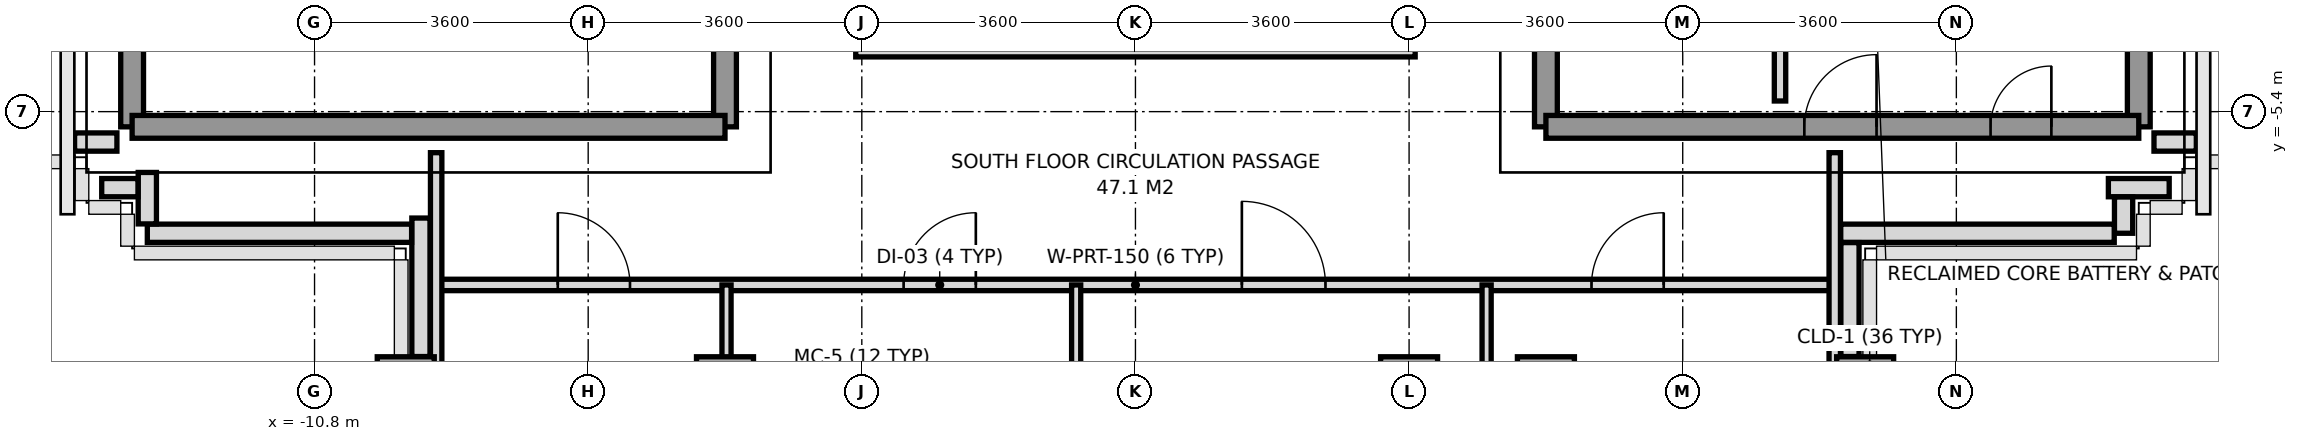
"""IFC4 building model, lengths in metres.
Left out: names, types, materials, properties, quantities, classifications, styles, units other than length and angle.
Written with IfcOpenShell. Run it as: python <this file> out.ifc"""

import sys

from ifc_helpers import new_model, si_unit, direction, frame, frame_2d, origin, origin_2d, place, context, subcontext, project, spatial, rectangle, extrude, source, transform, mapped, element, fill, save


model = new_model("IFC4")
c1 = context("Model", 3, precision=1e-05, world=origin(), true_north=direction((0.0, 1.0)))
c2 = subcontext(c1, "Body", "Model", "MODEL_VIEW")
j1 = project(units=[si_unit("LENGTHUNIT", "METRE"), si_unit("PLANEANGLEUNIT", "RADIAN")], contexts=[c1])
p1 = place(None, origin())
s1 = spatial("IfcSite", under=j1, at=p1, CompositionType="ELEMENT")
p2 = place(p1, origin())
s2 = spatial("IfcBuilding", under=s1, at=p2, CompositionType="ELEMENT")
p3 = place(p2, frame((0.0, 0.0, 262.0)))
s3 = spatial("IfcBuildingStorey", under=s2, at=p3, CompositionType="ELEMENT", Elevation=262.0)
m1 = source(origin(), c2, "Body", "SweptSolid", [
    extrude(rectangle(XDim=0.75, YDim=0.75, at=origin_2d()), origin(), (0.0, 0.0, 1.0), 3.01),
])
for number, where, z_axis, x_axis in (
    (1, (-9.6, -9.0, 0.0), (0.0, 0.0, 1.0), (1.0, 0.0, 0.0)),
    (2, (-5.4, -9.0, 0.0), (0.0, 0.0, 1.0), (1.0, 0.0, 0.0)),
    (3, (-3.6, -9.0, 0.0), (0.0, 0.0, 1.0), (1.0, 0.0, 0.0)),
    (4, (3.6, -9.0, 0.0), (0.0, 0.0, 1.0), (1.0, 0.0, 0.0)),
    (5, (5.4, -9.0, 0.0), (0.0, 0.0, 1.0), (1.0, 0.0, 0.0)),
    (6, (9.6, -9.0, 0.0), (0.0, 0.0, 1.0), (1.0, 0.0, 0.0)),
):
    element("IfcColumn", number, at=place(p3, frame(where, z_axis=z_axis, x_axis=x_axis)), inside=s3, PredefinedType="COLUMN", context=c2, shape_type="MappedRepresentation", body=[
        mapped(m1, transform((0.0, 0.0, 0.0), x_axis=(1.0, 0.0, 0.0), y_axis=(0.0, 1.0, 0.0), z_axis=(0.0, 0.0, 1.0), scale=1.0)),
    ])
p4 = place(p3, frame((13.957, -5.8, 0.0), z_axis=(0.0, 0.0, 1.0), x_axis=(-1.0, 0.0, 0.0)))
e7 = element("IfcWall", 7, at=p4, inside=s3, PredefinedType="PARAPET", context=c2, shape_type="SweptSolid", body=[
    extrude(rectangle(XDim=0.557, YDim=0.24, at=frame_2d((0.279, 0.0))), origin(), (0.0, 0.0, 1.0), 1.15),
])
p5 = place(p3, frame((13.6, -6.4, 0.0), z_axis=(0.0, 0.0, 1.0), x_axis=(-1.0, 0.0, 0.0)))
e8 = element("IfcWall", 8, at=p5, inside=s3, PredefinedType="PARAPET", context=c2, shape_type="SweptSolid", body=[
    extrude(rectangle(XDim=0.8, YDim=0.24, at=frame_2d((0.4, 0.0))), origin(), (0.0, 0.0, 1.0), 1.15),
])
p6 = place(p3, frame((13.0, -6.523, 0.0), z_axis=(0.0, 0.0, 1.0), x_axis=(0.0, -1.0, 0.0)))
e9 = element("IfcWall", 9, at=p6, inside=s3, PredefinedType="PARAPET", context=c2, shape_type="SweptSolid", body=[
    extrude(rectangle(XDim=0.477, YDim=0.24, at=frame_2d((0.239, 0.0))), origin(), (0.0, 0.0, 1.0), 1.15),
])
p7 = place(p3, frame((12.877, -7.0, 0.0), z_axis=(0.0, 0.0, 1.0), x_axis=(-1.0, 0.0, 0.0)))
e10 = element("IfcWall", 10, at=p7, inside=s3, PredefinedType="PARAPET", context=c2, shape_type="SweptSolid", body=[
    extrude(rectangle(XDim=3.599, YDim=0.24, at=frame_2d((1.799, 0.0))), origin(), (0.0, 0.0, 1.0), 1.15),
])
p8 = place(p3, frame((9.4, -7.123, 0.0), z_axis=(0.0, 0.0, 1.0), x_axis=(0.0, -1.0, 0.0)))
e11 = element("IfcWall", 11, at=p8, inside=s3, PredefinedType="PARAPET", context=c2, shape_type="SweptSolid", body=[
    extrude(rectangle(XDim=1.499, YDim=0.24, at=frame_2d((0.75, 0.0))), origin(), (0.0, 0.0, 1.0), 1.15),
])
p9 = place(p3, frame((-9.4, -8.622, 0.0), z_axis=(0.0, 0.0, 1.0), x_axis=(0.0, 1.0, 0.0)))
e12 = element("IfcWall", 12, at=p9, inside=s3, PredefinedType="PARAPET", context=c2, shape_type="SweptSolid", body=[
    extrude(rectangle(XDim=1.822, YDim=0.24, at=frame_2d((0.911, 0.0))), origin(), (0.0, 0.0, 1.0), 1.15),
])
p10 = place(p3, frame((-9.523, -7.0, 0.0), z_axis=(0.0, 0.0, 1.0), x_axis=(-1.0, 0.0, 0.0)))
e13 = element("IfcWall", 13, at=p10, inside=s3, PredefinedType="PARAPET", context=c2, shape_type="SweptSolid", body=[
    extrude(rectangle(XDim=3.477, YDim=0.24, at=frame_2d((1.739, 0.0))), origin(), (0.0, 0.0, 1.0), 1.15),
])
p11 = place(p3, frame((-13.0, -6.877, 0.0), z_axis=(0.0, 0.0, 1.0), x_axis=(0.0, 1.0, 0.0)))
e14 = element("IfcWall", 14, at=p11, inside=s3, PredefinedType="PARAPET", context=c2, shape_type="SweptSolid", body=[
    extrude(rectangle(XDim=0.677, YDim=0.24, at=frame_2d((0.338, 0.0))), origin(), (0.0, 0.0, 1.0), 1.15),
])
p12 = place(p3, frame((-13.123, -6.4, 0.0), z_axis=(0.0, 0.0, 1.0), x_axis=(-1.0, 0.0, 0.0)))
e15 = element("IfcWall", 15, at=p12, inside=s3, PredefinedType="PARAPET", context=c2, shape_type="SweptSolid", body=[
    extrude(rectangle(XDim=0.477, YDim=0.24, at=frame_2d((0.239, 0.0))), origin(), (0.0, 0.0, 1.0), 1.15),
])
p13 = place(p3, frame((-13.4, -5.8, 0.0), z_axis=(0.0, 0.0, 1.0), x_axis=(-1.0, 0.0, 0.0)))
e16 = element("IfcWall", 16, at=p13, inside=s3, PredefinedType="PARAPET", context=c2, shape_type="SweptSolid", body=[
    extrude(rectangle(XDim=0.557, YDim=0.24, at=frame_2d((0.279, 0.0))), origin(), (0.0, 0.0, 1.0), 1.15),
])
p14 = place(p3, frame((-13.2, -5.6, 0.0), z_axis=(0.0, 0.0, 1.0), x_axis=(0.0, 1.0, 0.0)))
e17 = element("IfcWall", 17, at=p14, inside=s3, PredefinedType="SHEAR", context=c2, shape_type="SweptSolid", body=[
    extrude(rectangle(XDim=11.2, YDim=0.3, at=frame_2d((5.6, 0.0))), origin(), (0.0, 0.0, 1.0), 3.01),
])
p15 = place(p3, frame((-5.4, -5.6, 0.0), z_axis=(0.0, 0.0, 1.0), x_axis=(0.0, 1.0, 0.0)))
e18 = element("IfcWall", 18, at=p15, inside=s3, PredefinedType="SHEAR", context=c2, shape_type="SweptSolid", body=[
    extrude(rectangle(XDim=12.5, YDim=0.3, at=frame_2d((6.25, 0.0))), origin(), (0.0, 0.0, 1.0), 3.01),
])
p16 = place(p15, frame((4.55, 0.0, 0.0)))
e19 = element("IfcOpeningElement", 19, at=p16, cuts=e18, PredefinedType="OPENING", context=c2, shape_type="SweptSolid", body=[
    extrude(rectangle(XDim=1.2, YDim=2.2, at=frame_2d((0.6, 1.1))), frame((0.0, 0.16, 0.0), z_axis=(0.0, -1.0, 0.0), x_axis=(1.0, 0.0, 0.0)), (0.0, 0.0, 1.0), 0.32),
])
p17 = place(p15, frame((10.45, 0.0, 0.0)))
e20 = element("IfcOpeningElement", 20, at=p17, cuts=e18, PredefinedType="OPENING", context=c2, shape_type="SweptSolid", body=[
    extrude(rectangle(XDim=1.2, YDim=2.2, at=frame_2d((0.6, 1.1))), frame((0.0, 0.16, 0.0), z_axis=(0.0, -1.0, 0.0), x_axis=(1.0, 0.0, 0.0)), (0.0, 0.0, 1.0), 0.32),
])
p18 = place(p3, frame((-13.2, -5.6, 0.0), z_axis=(0.0, 0.0, 1.0), x_axis=(1.0, 0.0, 0.0)))
e21 = element("IfcWall", 21, at=p18, inside=s3, PredefinedType="SHEAR", context=c2, shape_type="SweptSolid", body=[
    extrude(rectangle(XDim=7.8, YDim=0.3, at=frame_2d((3.9, 0.0))), origin(), (0.0, 0.0, 1.0), 3.01),
])
p19 = place(p3, frame((13.2, -5.6, 0.0), z_axis=(0.0, 0.0, 1.0), x_axis=(0.0, 1.0, 0.0)))
e22 = element("IfcWall", 22, at=p19, inside=s3, PredefinedType="SHEAR", context=c2, shape_type="SweptSolid", body=[
    extrude(rectangle(XDim=11.2, YDim=0.3, at=frame_2d((5.6, 0.0))), origin(), (0.0, 0.0, 1.0), 3.01),
])
p20 = place(p3, frame((5.4, -5.6, 0.0), z_axis=(0.0, 0.0, 1.0), x_axis=(0.0, 1.0, 0.0)))
e23 = element("IfcWall", 23, at=p20, inside=s3, PredefinedType="SHEAR", context=c2, shape_type="SweptSolid", body=[
    extrude(rectangle(XDim=12.5, YDim=0.3, at=frame_2d((6.25, 0.0))), origin(), (0.0, 0.0, 1.0), 3.01),
])
p21 = place(p20, frame((4.55, 0.0, 0.0)))
e24 = element("IfcOpeningElement", 24, at=p21, cuts=e23, PredefinedType="OPENING", context=c2, shape_type="SweptSolid", body=[
    extrude(rectangle(XDim=1.2, YDim=2.2, at=frame_2d((0.6, 1.1))), frame((0.0, 0.16, 0.0), z_axis=(0.0, -1.0, 0.0), x_axis=(1.0, 0.0, 0.0)), (0.0, 0.0, 1.0), 0.32),
])
p22 = place(p20, frame((10.45, 0.0, 0.0)))
e25 = element("IfcOpeningElement", 25, at=p22, cuts=e23, PredefinedType="OPENING", context=c2, shape_type="SweptSolid", body=[
    extrude(rectangle(XDim=1.2, YDim=2.2, at=frame_2d((0.6, 1.1))), frame((0.0, 0.16, 0.0), z_axis=(0.0, -1.0, 0.0), x_axis=(1.0, 0.0, 0.0)), (0.0, 0.0, 1.0), 0.32),
])
p23 = place(p20, frame((7.88, 0.0, 0.0)))
e26 = element("IfcOpeningElement", 26, at=p23, cuts=e23, PredefinedType="OPENING", context=c2, shape_type="SweptSolid", body=[
    extrude(rectangle(XDim=0.8, YDim=2.1, at=frame_2d((0.4, 1.05))), frame((0.0, 0.16, 0.0), z_axis=(0.0, -1.0, 0.0), x_axis=(1.0, 0.0, 0.0)), (0.0, 0.0, 1.0), 0.32),
])
p24 = place(p3, frame((5.4, -5.6, 0.0), z_axis=(0.0, 0.0, 1.0), x_axis=(1.0, 0.0, 0.0)))
e27 = element("IfcWall", 27, at=p24, inside=s3, PredefinedType="SHEAR", context=c2, shape_type="SweptSolid", body=[
    extrude(rectangle(XDim=7.8, YDim=0.3, at=frame_2d((3.9, 0.0))), origin(), (0.0, 0.0, 1.0), 3.01),
])
p25 = place(p24, frame((5.85, 0.0, 0.0)))
e28 = element("IfcOpeningElement", 28, at=p25, cuts=e27, PredefinedType="OPENING", context=c2, shape_type="SweptSolid", body=[
    extrude(rectangle(XDim=0.8, YDim=2.1, at=frame_2d((0.4, 1.05))), frame((0.0, 0.16, 0.0), z_axis=(0.0, -1.0, 0.0), x_axis=(1.0, 0.0, 0.0)), (0.0, 0.0, 1.0), 0.32),
])
p26 = place(p24, frame((3.4, 0.0, 0.0)))
e29 = element("IfcOpeningElement", 29, at=p26, cuts=e27, PredefinedType="OPENING", context=c2, shape_type="SweptSolid", body=[
    extrude(rectangle(XDim=0.95, YDim=2.15, at=frame_2d((0.475, 1.075))), frame((0.0, 0.16, 0.0), z_axis=(0.0, -1.0, 0.0), x_axis=(1.0, 0.0, 0.0)), (0.0, 0.0, 1.0), 0.32),
])
p27 = place(p3, frame((8.48, -5.26, 0.0), z_axis=(0.0, 0.0, 1.0), x_axis=(0.0, 1.0, 0.0)))
e30 = element("IfcWall", 30, at=p27, inside=s3, PredefinedType="PARTITIONING", context=c2, shape_type="SweptSolid", body=[
    extrude(rectangle(XDim=2.94, YDim=0.15, at=frame_2d((1.47, 0.0))), origin(), (0.0, 0.0, 1.0), 3.01),
])
p28 = place(p3, frame((-9.2, -7.68, 0.0), z_axis=(0.0, 0.0, 1.0), x_axis=(1.0, 0.0, 0.0)))
e31 = element("IfcWall", 31, at=p28, inside=s3, PredefinedType="PARTITIONING", context=c2, shape_type="SweptSolid", body=[
    extrude(rectangle(XDim=18.4, YDim=0.15, at=frame_2d((9.2, 0.0))), origin(), (0.0, 0.0, 1.0), 2.57),
])
p29 = place(p28, frame((1.6, 0.0, 0.0)))
e32 = element("IfcOpeningElement", 32, at=p29, cuts=e31, PredefinedType="OPENING", context=c2, shape_type="SweptSolid", body=[
    extrude(rectangle(XDim=0.95, YDim=2.15, at=frame_2d((0.475, 1.075))), frame((0.0, 0.085, 0.0), z_axis=(0.0, -1.0, 0.0), x_axis=(1.0, 0.0, 0.0)), (0.0, 0.0, 1.0), 0.17),
])
p30 = place(p28, frame((6.15, 0.0, 0.0)))
e33 = element("IfcOpeningElement", 33, at=p30, cuts=e31, PredefinedType="OPENING", context=c2, shape_type="SweptSolid", body=[
    extrude(rectangle(XDim=0.95, YDim=2.15, at=frame_2d((0.475, 1.075))), frame((0.0, 0.085, 0.0), z_axis=(0.0, -1.0, 0.0), x_axis=(1.0, 0.0, 0.0)), (0.0, 0.0, 1.0), 0.17),
])
p31 = place(p28, frame((10.6, 0.0, 0.0)))
e34 = element("IfcOpeningElement", 34, at=p31, cuts=e31, PredefinedType="OPENING", context=c2, shape_type="SweptSolid", body=[
    extrude(rectangle(XDim=1.1, YDim=2.2, at=frame_2d((0.55, 1.1))), frame((0.0, 0.085, 0.0), z_axis=(0.0, -1.0, 0.0), x_axis=(1.0, 0.0, 0.0)), (0.0, 0.0, 1.0), 0.17),
])
p32 = place(p28, frame((15.2, 0.0, 0.0)))
e35 = element("IfcOpeningElement", 35, at=p32, cuts=e31, PredefinedType="OPENING", context=c2, shape_type="SweptSolid", body=[
    extrude(rectangle(XDim=0.95, YDim=2.15, at=frame_2d((0.475, 1.075))), frame((0.0, 0.085, 0.0), z_axis=(0.0, -1.0, 0.0), x_axis=(1.0, 0.0, 0.0)), (0.0, 0.0, 1.0), 0.17),
])
for number, where, z_axis, x_axis in (
    (36, (-9.2, -10.28, 0.0), (0.0, 0.0, 1.0), (0.0, 1.0, 0.0)),
    (37, (9.2, -10.28, 0.0), (0.0, 0.0, 1.0), (0.0, 1.0, 0.0)),
):
    element("IfcWall", number, at=place(p3, frame(where, z_axis=z_axis, x_axis=x_axis)), inside=s3, PredefinedType="PARTITIONING", context=c2, shape_type="SweptSolid", body=[
        extrude(rectangle(XDim=4.34, YDim=0.15, at=frame_2d((2.17, 0.0))), origin(), (0.0, 0.0, 1.0), 2.61),
    ])
for number, where, z_axis, x_axis in (
    (38, (-5.38, -19.25, 0.0), (0.0, 0.0, 1.0), (0.0, 1.0, 0.0)),
    (39, (-0.78, -19.25, 0.0), (0.0, 0.0, 1.0), (0.0, 1.0, 0.0)),
    (40, (4.62, -19.25, 0.0), (0.0, 0.0, 1.0), (0.0, 1.0, 0.0)),
):
    element("IfcWall", number, at=place(p3, frame(where, z_axis=z_axis, x_axis=x_axis)), inside=s3, PredefinedType="PARTITIONING", context=c2, shape_type="SweptSolid", body=[
        extrude(rectangle(XDim=11.57, YDim=0.12, at=frame_2d((5.785, 0.0))), origin(), (0.0, 0.0, 1.0), 2.61),
    ])
p33 = place(p3, frame((-3.68, -4.56, 0.0), z_axis=(0.0, 0.0, 1.0), x_axis=(1.0, 0.0, 0.0)))
e41 = element("IfcWall", 41, at=p33, inside=s3, PredefinedType="PARAPET", context=c2, shape_type="SweptSolid", body=[
    extrude(rectangle(XDim=7.36, YDim=0.24, at=frame_2d((3.68, 0.0))), origin(), (0.0, 0.0, 1.0), 1.15),
])
m2 = source(origin(), c2, "Body", "SweptSolid", [
    extrude(rectangle(XDim=0.8, YDim=2.1, at=frame_2d((0.4, 1.05))), frame((0.0, 0.025, 0.0), z_axis=(0.0, -1.0, 0.0), x_axis=(1.0, 0.0, 0.0)), (0.0, 0.0, 1.0), 0.05),
])
p34 = place(p25, origin())
e42 = element("IfcDoor", 42, at=p34, inside=s3, OperationType="SINGLE_SWING_RIGHT", PredefinedType="DOOR", context=c2, shape_type="MappedRepresentation", body=[
    mapped(m2, transform((0.0, 0.0, 0.0), x_axis=(1.0, 0.0, 0.0), y_axis=(0.0, 1.0, 0.0), z_axis=(0.0, 0.0, 1.0), scale=1.0)),
])
fill(e28, e42)
m3 = source(origin(), c2, "Body", "SweptSolid", [
    extrude(rectangle(XDim=0.95, YDim=2.15, at=frame_2d((0.475, 1.075))), frame((0.0, 0.025, 0.0), z_axis=(0.0, -1.0, 0.0), x_axis=(1.0, 0.0, 0.0)), (0.0, 0.0, 1.0), 0.05),
])
p35 = place(p26, origin())
e43 = element("IfcDoor", 43, at=p35, inside=s3, OperationType="SINGLE_SWING_RIGHT", PredefinedType="DOOR", context=c2, shape_type="MappedRepresentation", body=[
    mapped(m3, transform((0.0, 0.0, 0.0), x_axis=(1.0, 0.0, 0.0), y_axis=(0.0, 1.0, 0.0), z_axis=(0.0, 0.0, 1.0), scale=1.0)),
])
fill(e29, e43)
p36 = place(p29, origin())
e44 = element("IfcDoor", 44, at=p36, inside=s3, OperationType="SINGLE_SWING_LEFT", PredefinedType="DOOR", context=c2, shape_type="MappedRepresentation", body=[
    mapped(m3, transform((0.0, 0.0, 0.0), x_axis=(1.0, 0.0, 0.0), y_axis=(0.0, 1.0, 0.0), z_axis=(0.0, 0.0, 1.0), scale=1.0)),
])
fill(e32, e44)
p37 = place(p30, origin())
e45 = element("IfcDoor", 45, at=p37, inside=s3, OperationType="SINGLE_SWING_RIGHT", PredefinedType="DOOR", context=c2, shape_type="MappedRepresentation", body=[
    mapped(m3, transform((0.0, 0.0, 0.0), x_axis=(1.0, 0.0, 0.0), y_axis=(0.0, 1.0, 0.0), z_axis=(0.0, 0.0, 1.0), scale=1.0)),
])
fill(e33, e45)
m4 = source(origin(), c2, "Body", "SweptSolid", [
    extrude(rectangle(XDim=1.1, YDim=2.2, at=frame_2d((0.55, 1.1))), frame((0.0, 0.025, 0.0), z_axis=(0.0, -1.0, 0.0), x_axis=(1.0, 0.0, 0.0)), (0.0, 0.0, 1.0), 0.05),
])
p38 = place(p31, origin())
e46 = element("IfcDoor", 46, at=p38, inside=s3, OperationType="SINGLE_SWING_LEFT", PredefinedType="DOOR", context=c2, shape_type="MappedRepresentation", body=[
    mapped(m4, transform((0.0, 0.0, 0.0), x_axis=(1.0, 0.0, 0.0), y_axis=(0.0, 1.0, 0.0), z_axis=(0.0, 0.0, 1.0), scale=1.0)),
])
fill(e34, e46)
p39 = place(p32, origin())
e47 = element("IfcDoor", 47, at=p39, inside=s3, OperationType="SINGLE_SWING_RIGHT", PredefinedType="DOOR", context=c2, shape_type="MappedRepresentation", body=[
    mapped(m3, transform((0.0, 0.0, 0.0), x_axis=(1.0, 0.0, 0.0), y_axis=(0.0, 1.0, 0.0), z_axis=(0.0, 0.0, 1.0), scale=1.0)),
])
fill(e35, e47)
save(model, sys.argv[1])
